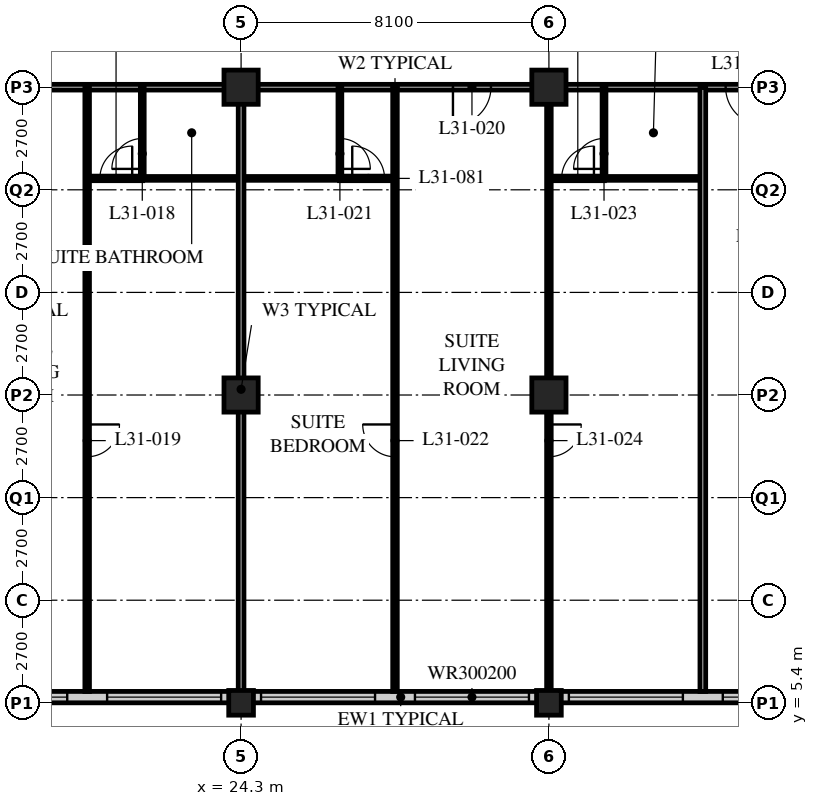
"""IFC4 building model, lengths in metres.
Left out: names, types, materials, properties, quantities, classifications, styles, units other than length and angle.
Written with IfcOpenShell. Run it as: python <this file> out.ifc"""

import sys

from ifc_helpers import new_model, si_unit, direction, frame, frame_2d, origin, origin_2d, place, context, subcontext, project, spatial, rectangle, hollow_rectangle, extrude, element, fill, save


model = new_model("IFC4")
c1 = context("Model", 3, precision=1e-05, world=origin(), true_north=direction((0.0, 1.0)))
c2 = subcontext(c1, "Body", "Model", "MODEL_VIEW")
j1 = project(units=[si_unit("LENGTHUNIT", "METRE"), si_unit("PLANEANGLEUNIT", "RADIAN")], contexts=[c1])
p1 = place(None, origin())
s1 = spatial("IfcSite", under=j1, at=p1, CompositionType="ELEMENT")
p2 = place(p1, origin())
s2 = spatial("IfcBuilding", under=s1, at=p2, CompositionType="ELEMENT")
p3 = place(p2, frame((0.0, 0.0, 123.8)))
s3 = spatial("IfcBuildingStorey", under=s2, at=p3, CompositionType="ELEMENT", Elevation=123.8)
p4 = place(p3, frame((24.3, 5.4, 0.0), z_axis=(0.0, 0.0, 1.0), x_axis=(1.0, 0.0, 0.0)))
e1 = element("IfcColumn", 1, at=p4, inside=s3, PredefinedType="COLUMN", context=c2, shape_type="SweptSolid", body=[
    extrude(hollow_rectangle(XDim=0.65, YDim=0.65, WallThickness=0.055, at=origin_2d()), origin(), (0.0, 0.0, 1.0), 3.4),
])
for number, where, z_axis, x_axis in (
    (2, (24.3, 13.5, 0.0), (0.0, 0.0, 1.0), (1.0, 0.0, 0.0)),
    (3, (24.3, 21.6, 0.0), (0.0, 0.0, 1.0), (1.0, 0.0, 0.0)),
):
    element("IfcColumn", number, at=place(p3, frame(where, z_axis=z_axis, x_axis=x_axis)), inside=s3, PredefinedType="COLUMN", context=c2, shape_type="SweptSolid", body=[
        extrude(hollow_rectangle(XDim=0.9, YDim=0.9, WallThickness=0.09, at=origin_2d()), origin(), (0.0, 0.0, 1.0), 3.4),
    ])
p5 = place(p3, frame((32.4, 5.4, 0.0), z_axis=(0.0, 0.0, 1.0), x_axis=(1.0, 0.0, 0.0)))
e4 = element("IfcColumn", 4, at=p5, inside=s3, PredefinedType="COLUMN", context=c2, shape_type="SweptSolid", body=[
    extrude(hollow_rectangle(XDim=0.65, YDim=0.65, WallThickness=0.055, at=origin_2d()), origin(), (0.0, 0.0, 1.0), 3.4),
])
for number, where, z_axis, x_axis in (
    (5, (32.4, 13.5, 0.0), (0.0, 0.0, 1.0), (1.0, 0.0, 0.0)),
    (6, (32.4, 21.6, 0.0), (0.0, 0.0, 1.0), (1.0, 0.0, 0.0)),
):
    element("IfcColumn", number, at=place(p3, frame(where, z_axis=z_axis, x_axis=x_axis)), inside=s3, PredefinedType="COLUMN", context=c2, shape_type="SweptSolid", body=[
        extrude(hollow_rectangle(XDim=0.9, YDim=0.9, WallThickness=0.09, at=origin_2d()), origin(), (0.0, 0.0, 1.0), 3.4),
    ])
p6 = place(p3, frame((8.4, 5.55, 0.0), z_axis=(0.0, 0.0, 1.0), x_axis=(1.0, 0.0, 0.0)))
e7 = element("IfcWall", 7, at=p6, inside=s3, PredefinedType="SOLIDWALL", context=c2, shape_type="SweptSolid", body=[
    extrude(rectangle(XDim=40.2, YDim=0.3, at=frame_2d((20.1, 0.0))), origin(), (0.0, 0.0, 1.0), 3.19),
])
p7 = place(p6, frame((0.225, 0.0, 0.9)))
e8 = element("IfcOpeningElement", 8, at=p7, cuts=e7, PredefinedType="OPENING", context=c2, shape_type="SweptSolid", body=[
    extrude(rectangle(XDim=3.0, YDim=2.0, at=frame_2d((1.5, 1.0))), frame((0.0, 0.16, 0.0), z_axis=(0.0, -1.0, 0.0), x_axis=(1.0, 0.0, 0.0)), (0.0, 0.0, 1.0), 0.32),
])
p8 = place(p6, frame((4.275, 0.0, 0.9)))
e9 = element("IfcOpeningElement", 9, at=p8, cuts=e7, PredefinedType="OPENING", context=c2, shape_type="SweptSolid", body=[
    extrude(rectangle(XDim=3.0, YDim=2.0, at=frame_2d((1.5, 1.0))), frame((0.0, 0.16, 0.0), z_axis=(0.0, -1.0, 0.0), x_axis=(1.0, 0.0, 0.0)), (0.0, 0.0, 1.0), 0.32),
])
p9 = place(p6, frame((8.325, 0.0, 0.9)))
e10 = element("IfcOpeningElement", 10, at=p9, cuts=e7, PredefinedType="OPENING", context=c2, shape_type="SweptSolid", body=[
    extrude(rectangle(XDim=3.0, YDim=2.0, at=frame_2d((1.5, 1.0))), frame((0.0, 0.16, 0.0), z_axis=(0.0, -1.0, 0.0), x_axis=(1.0, 0.0, 0.0)), (0.0, 0.0, 1.0), 0.32),
])
p10 = place(p6, frame((12.375, 0.0, 0.9)))
e11 = element("IfcOpeningElement", 11, at=p10, cuts=e7, PredefinedType="OPENING", context=c2, shape_type="SweptSolid", body=[
    extrude(rectangle(XDim=3.0, YDim=2.0, at=frame_2d((1.5, 1.0))), frame((0.0, 0.16, 0.0), z_axis=(0.0, -1.0, 0.0), x_axis=(1.0, 0.0, 0.0)), (0.0, 0.0, 1.0), 0.32),
])
p11 = place(p6, frame((16.425, 0.0, 0.9)))
e12 = element("IfcOpeningElement", 12, at=p11, cuts=e7, PredefinedType="OPENING", context=c2, shape_type="SweptSolid", body=[
    extrude(rectangle(XDim=3.0, YDim=2.0, at=frame_2d((1.5, 1.0))), frame((0.0, 0.16, 0.0), z_axis=(0.0, -1.0, 0.0), x_axis=(1.0, 0.0, 0.0)), (0.0, 0.0, 1.0), 0.32),
])
p12 = place(p6, frame((20.475, 0.0, 0.9)))
e13 = element("IfcOpeningElement", 13, at=p12, cuts=e7, PredefinedType="OPENING", context=c2, shape_type="SweptSolid", body=[
    extrude(rectangle(XDim=3.0, YDim=2.0, at=frame_2d((1.5, 1.0))), frame((0.0, 0.16, 0.0), z_axis=(0.0, -1.0, 0.0), x_axis=(1.0, 0.0, 0.0)), (0.0, 0.0, 1.0), 0.32),
])
p13 = place(p6, frame((24.525, 0.0, 0.9)))
e14 = element("IfcOpeningElement", 14, at=p13, cuts=e7, PredefinedType="OPENING", context=c2, shape_type="SweptSolid", body=[
    extrude(rectangle(XDim=3.0, YDim=2.0, at=frame_2d((1.5, 1.0))), frame((0.0, 0.16, 0.0), z_axis=(0.0, -1.0, 0.0), x_axis=(1.0, 0.0, 0.0)), (0.0, 0.0, 1.0), 0.32),
])
p14 = place(p6, frame((28.575, 0.0, 0.9)))
e15 = element("IfcOpeningElement", 15, at=p14, cuts=e7, PredefinedType="OPENING", context=c2, shape_type="SweptSolid", body=[
    extrude(rectangle(XDim=3.0, YDim=2.0, at=frame_2d((1.5, 1.0))), frame((0.0, 0.16, 0.0), z_axis=(0.0, -1.0, 0.0), x_axis=(1.0, 0.0, 0.0)), (0.0, 0.0, 1.0), 0.32),
])
p15 = place(p6, frame((32.625, 0.0, 0.9)))
e16 = element("IfcOpeningElement", 16, at=p15, cuts=e7, PredefinedType="OPENING", context=c2, shape_type="SweptSolid", body=[
    extrude(rectangle(XDim=3.0, YDim=2.0, at=frame_2d((1.5, 1.0))), frame((0.0, 0.16, 0.0), z_axis=(0.0, -1.0, 0.0), x_axis=(1.0, 0.0, 0.0)), (0.0, 0.0, 1.0), 0.32),
])
p16 = place(p6, frame((36.675, 0.0, 0.9)))
e17 = element("IfcOpeningElement", 17, at=p16, cuts=e7, PredefinedType="OPENING", context=c2, shape_type="SweptSolid", body=[
    extrude(rectangle(XDim=3.0, YDim=2.0, at=frame_2d((1.5, 1.0))), frame((0.0, 0.16, 0.0), z_axis=(0.0, -1.0, 0.0), x_axis=(1.0, 0.0, 0.0)), (0.0, 0.0, 1.0), 0.32),
])
p17 = place(p3, frame((8.1, 21.6, 0.0), z_axis=(0.0, 0.0, 1.0), x_axis=(1.0, 0.0, 0.0)))
e18 = element("IfcWall", 18, at=p17, inside=s3, PredefinedType="PARTITIONING", context=c2, shape_type="SweptSolid", body=[
    extrude(rectangle(XDim=40.5, YDim=0.15, at=frame_2d((20.25, 0.0))), origin(), (0.0, 0.0, 1.0), 2.578),
])
p18 = place(p17, frame((9.625, 0.0, 0.0)))
e19 = element("IfcOpeningElement", 19, at=p18, cuts=e18, PredefinedType="OPENING", context=c2, shape_type="SweptSolid", body=[
    extrude(rectangle(XDim=1.0, YDim=2.1, at=frame_2d((0.5, 1.05))), frame((0.0, 0.085, 0.0), z_axis=(0.0, -1.0, 0.0), x_axis=(1.0, 0.0, 0.0)), (0.0, 0.0, 1.0), 0.17),
])
p19 = place(p17, frame((21.775, 0.0, 0.0)))
e20 = element("IfcOpeningElement", 20, at=p19, cuts=e18, PredefinedType="OPENING", context=c2, shape_type="SweptSolid", body=[
    extrude(rectangle(XDim=1.0, YDim=2.1, at=frame_2d((0.5, 1.05))), frame((0.0, 0.085, 0.0), z_axis=(0.0, -1.0, 0.0), x_axis=(1.0, 0.0, 0.0)), (0.0, 0.0, 1.0), 0.17),
])
p20 = place(p17, frame((28.95, 0.0, 0.0)))
e21 = element("IfcOpeningElement", 21, at=p20, cuts=e18, PredefinedType="OPENING", context=c2, shape_type="SweptSolid", body=[
    extrude(rectangle(XDim=1.0, YDim=2.1, at=frame_2d((0.5, 1.05))), frame((0.0, 0.085, 0.0), z_axis=(0.0, -1.0, 0.0), x_axis=(1.0, 0.0, 0.0)), (0.0, 0.0, 1.0), 0.17),
])
p21 = place(p17, frame((34.85, 0.0, 0.0)))
e22 = element("IfcOpeningElement", 22, at=p21, cuts=e18, PredefinedType="OPENING", context=c2, shape_type="SweptSolid", body=[
    extrude(rectangle(XDim=1.0, YDim=2.1, at=frame_2d((0.5, 1.05))), frame((0.0, 0.085, 0.0), z_axis=(0.0, -1.0, 0.0), x_axis=(1.0, 0.0, 0.0)), (0.0, 0.0, 1.0), 0.17),
])
p22 = place(p17, frame((1.525, 0.0, 0.0)))
e23 = element("IfcOpeningElement", 23, at=p22, cuts=e18, PredefinedType="OPENING", context=c2, shape_type="SweptSolid", body=[
    extrude(rectangle(XDim=1.0, YDim=2.1, at=frame_2d((0.5, 1.05))), frame((0.0, 0.085, 0.0), z_axis=(0.0, -1.0, 0.0), x_axis=(1.0, 0.0, 0.0)), (0.0, 0.0, 1.0), 0.17),
])
p23 = place(p17, frame((37.975, 0.0, 0.0)))
e24 = element("IfcOpeningElement", 24, at=p23, cuts=e18, PredefinedType="OPENING", context=c2, shape_type="SweptSolid", body=[
    extrude(rectangle(XDim=1.0, YDim=2.1, at=frame_2d((0.5, 1.05))), frame((0.0, 0.085, 0.0), z_axis=(0.0, -1.0, 0.0), x_axis=(1.0, 0.0, 0.0)), (0.0, 0.0, 1.0), 0.17),
])
p24 = place(p3, frame((21.7, 19.2, 0.0), z_axis=(0.0, 0.0, 1.0), x_axis=(1.0, 0.0, 0.0)))
e25 = element("IfcWall", 25, at=p24, inside=s3, PredefinedType="PARTITIONING", context=c2, shape_type="SweptSolid", body=[
    extrude(rectangle(XDim=5.2, YDim=0.1, at=frame_2d((2.6, 0.0))), origin(), (0.0, 0.0, 1.0), 3.19),
])
p25 = place(p3, frame((21.7, 21.6, 0.0), z_axis=(0.0, 0.0, 1.0), x_axis=(0.0, -1.0, 0.0)))
e26 = element("IfcWall", 26, at=p25, inside=s3, PredefinedType="PARTITIONING", context=c2, shape_type="SweptSolid", body=[
    extrude(rectangle(XDim=2.4, YDim=0.1, at=frame_2d((1.2, 0.0))), origin(), (0.0, 0.0, 1.0), 3.19),
])
p26 = place(p25, frame((1.35, 0.0, 0.0)))
e27 = element("IfcOpeningElement", 27, at=p26, cuts=e26, PredefinedType="OPENING", context=c2, shape_type="SweptSolid", body=[
    extrude(rectangle(XDim=0.8, YDim=2.1, at=frame_2d((0.4, 1.05))), frame((0.0, 0.06, 0.0), z_axis=(0.0, -1.0, 0.0), x_axis=(1.0, 0.0, 0.0)), (0.0, 0.0, 1.0), 0.12),
])
p27 = place(p3, frame((20.25, 21.6, 0.0), z_axis=(0.0, 0.0, 1.0), x_axis=(0.0, -1.0, 0.0)))
e28 = element("IfcWall", 28, at=p27, inside=s3, PredefinedType="PARTITIONING", context=c2, shape_type="SweptSolid", body=[
    extrude(rectangle(XDim=15.9, YDim=0.12, at=frame_2d((7.95, 0.0))), origin(), (0.0, 0.0, 1.0), 3.19),
])
p28 = place(p27, frame((8.875, 0.0, 0.0)))
e29 = element("IfcOpeningElement", 29, at=p28, cuts=e28, PredefinedType="OPENING", context=c2, shape_type="SweptSolid", body=[
    extrude(rectangle(XDim=0.85, YDim=2.1, at=frame_2d((0.425, 1.05))), frame((0.0, 0.07, 0.0), z_axis=(0.0, -1.0, 0.0), x_axis=(1.0, 0.0, 0.0)), (0.0, 0.0, 1.0), 0.14),
])
p29 = place(p3, frame((24.3, 21.6, 0.0), z_axis=(0.0, 0.0, 1.0), x_axis=(0.0, -1.0, 0.0)))
e30 = element("IfcWall", 30, at=p29, inside=s3, PredefinedType="PARTITIONING", context=c2, shape_type="SweptSolid", body=[
    extrude(rectangle(XDim=15.9, YDim=0.15, at=frame_2d((7.95, 0.0))), origin(), (0.0, 0.0, 1.0), 2.578),
])
p30 = place(p3, frame((26.9, 21.6, 0.0), z_axis=(0.0, 0.0, 1.0), x_axis=(0.0, -1.0, 0.0)))
e31 = element("IfcWall", 31, at=p30, inside=s3, PredefinedType="PARTITIONING", context=c2, shape_type="SweptSolid", body=[
    extrude(rectangle(XDim=2.4, YDim=0.1, at=frame_2d((1.2, 0.0))), origin(), (0.0, 0.0, 1.0), 3.19),
])
p31 = place(p30, frame((1.35, 0.0, 0.0)))
e32 = element("IfcOpeningElement", 32, at=p31, cuts=e31, PredefinedType="OPENING", context=c2, shape_type="SweptSolid", body=[
    extrude(rectangle(XDim=0.8, YDim=2.1, at=frame_2d((0.4, 1.05))), frame((0.0, 0.06, 0.0), z_axis=(0.0, -1.0, 0.0), x_axis=(1.0, 0.0, 0.0)), (0.0, 0.0, 1.0), 0.12),
])
p32 = place(p3, frame((28.35, 21.6, 0.0), z_axis=(0.0, 0.0, 1.0), x_axis=(0.0, -1.0, 0.0)))
e33 = element("IfcWall", 33, at=p32, inside=s3, PredefinedType="PARTITIONING", context=c2, shape_type="SweptSolid", body=[
    extrude(rectangle(XDim=15.9, YDim=0.12, at=frame_2d((7.95, 0.0))), origin(), (0.0, 0.0, 1.0), 3.19),
])
p33 = place(p32, frame((8.875, 0.0, 0.0)))
e34 = element("IfcOpeningElement", 34, at=p33, cuts=e33, PredefinedType="OPENING", context=c2, shape_type="SweptSolid", body=[
    extrude(rectangle(XDim=0.85, YDim=2.1, at=frame_2d((0.425, 1.05))), frame((0.0, 0.07, 0.0), z_axis=(0.0, -1.0, 0.0), x_axis=(1.0, 0.0, 0.0)), (0.0, 0.0, 1.0), 0.14),
])
p34 = place(p3, frame((33.85, 19.2, 0.0), z_axis=(0.0, 0.0, 1.0), x_axis=(1.0, 0.0, 0.0)))
e35 = element("IfcWall", 35, at=p34, inside=s3, PredefinedType="PARTITIONING", context=c2, shape_type="SweptSolid", body=[
    extrude(rectangle(XDim=2.6, YDim=0.1, at=frame_2d((1.3, 0.0))), origin(), (0.0, 0.0, 1.0), 3.19),
])
p35 = place(p3, frame((33.85, 21.6, 0.0), z_axis=(0.0, 0.0, 1.0), x_axis=(0.0, -1.0, 0.0)))
e36 = element("IfcWall", 36, at=p35, inside=s3, PredefinedType="PARTITIONING", context=c2, shape_type="SweptSolid", body=[
    extrude(rectangle(XDim=2.4, YDim=0.1, at=frame_2d((1.2, 0.0))), origin(), (0.0, 0.0, 1.0), 3.19),
])
p36 = place(p35, frame((1.35, 0.0, 0.0)))
e37 = element("IfcOpeningElement", 37, at=p36, cuts=e36, PredefinedType="OPENING", context=c2, shape_type="SweptSolid", body=[
    extrude(rectangle(XDim=0.8, YDim=2.1, at=frame_2d((0.4, 1.05))), frame((0.0, 0.06, 0.0), z_axis=(0.0, -1.0, 0.0), x_axis=(1.0, 0.0, 0.0)), (0.0, 0.0, 1.0), 0.12),
])
p37 = place(p3, frame((32.4, 21.6, 0.0), z_axis=(0.0, 0.0, 1.0), x_axis=(0.0, -1.0, 0.0)))
e38 = element("IfcWall", 38, at=p37, inside=s3, PredefinedType="PARTITIONING", context=c2, shape_type="SweptSolid", body=[
    extrude(rectangle(XDim=15.9, YDim=0.12, at=frame_2d((7.95, 0.0))), origin(), (0.0, 0.0, 1.0), 2.578),
])
p38 = place(p37, frame((8.875, 0.0, 0.0)))
e39 = element("IfcOpeningElement", 39, at=p38, cuts=e38, PredefinedType="OPENING", context=c2, shape_type="SweptSolid", body=[
    extrude(rectangle(XDim=0.85, YDim=2.1, at=frame_2d((0.425, 1.05))), frame((0.0, 0.07, 0.0), z_axis=(0.0, -1.0, 0.0), x_axis=(1.0, 0.0, 0.0)), (0.0, 0.0, 1.0), 0.14),
])
p39 = place(p3, frame((36.45, 21.6, 0.0), z_axis=(0.0, 0.0, 1.0), x_axis=(0.0, -1.0, 0.0)))
e40 = element("IfcWall", 40, at=p39, inside=s3, PredefinedType="PARTITIONING", context=c2, shape_type="SweptSolid", body=[
    extrude(rectangle(XDim=15.9, YDim=0.15, at=frame_2d((7.95, 0.0))), origin(), (0.0, 0.0, 1.0), 3.19),
])
p40 = place(p3, frame((21.71, 19.2, 0.0), z_axis=(0.0, 0.0, 1.0), x_axis=(-1.0, 0.0, 0.0)))
e41 = element("IfcWall", 41, at=p40, inside=s3, PredefinedType="PARTITIONING", context=c2, shape_type="SweptSolid", body=[
    extrude(rectangle(XDim=1.46, YDim=0.12, at=frame_2d((0.73, 0.0))), origin(), (0.0, 0.0, 1.0), 3.19),
])
p41 = place(p40, frame((0.275, 0.0, 0.0)))
e42 = element("IfcOpeningElement", 42, at=p41, cuts=e41, PredefinedType="OPENING", context=c2, shape_type="SweptSolid", body=[
    extrude(rectangle(XDim=0.85, YDim=2.1, at=frame_2d((0.425, 1.05))), frame((0.0, 0.07, 0.0), z_axis=(0.0, -1.0, 0.0), x_axis=(1.0, 0.0, 0.0)), (0.0, 0.0, 1.0), 0.14),
])
p42 = place(p3, frame((28.35, 19.2, 0.0), z_axis=(0.0, 0.0, 1.0), x_axis=(-1.0, 0.0, 0.0)))
e43 = element("IfcWall", 43, at=p42, inside=s3, PredefinedType="PARTITIONING", context=c2, shape_type="SweptSolid", body=[
    extrude(rectangle(XDim=1.46, YDim=0.12, at=frame_2d((0.73, 0.0))), origin(), (0.0, 0.0, 1.0), 3.19),
])
p43 = place(p42, frame((0.275, 0.0, 0.0)))
e44 = element("IfcOpeningElement", 44, at=p43, cuts=e43, PredefinedType="OPENING", context=c2, shape_type="SweptSolid", body=[
    extrude(rectangle(XDim=0.85, YDim=2.1, at=frame_2d((0.425, 1.05))), frame((0.0, 0.07, 0.0), z_axis=(0.0, -1.0, 0.0), x_axis=(1.0, 0.0, 0.0)), (0.0, 0.0, 1.0), 0.14),
])
p44 = place(p3, frame((33.86, 19.2, 0.0), z_axis=(0.0, 0.0, 1.0), x_axis=(-1.0, 0.0, 0.0)))
e45 = element("IfcWall", 45, at=p44, inside=s3, PredefinedType="PARTITIONING", context=c2, shape_type="SweptSolid", body=[
    extrude(rectangle(XDim=1.46, YDim=0.12, at=frame_2d((0.73, 0.0))), origin(), (0.0, 0.0, 1.0), 3.19),
])
p45 = place(p44, frame((0.275, 0.0, 0.0)))
e46 = element("IfcOpeningElement", 46, at=p45, cuts=e45, PredefinedType="OPENING", context=c2, shape_type="SweptSolid", body=[
    extrude(rectangle(XDim=0.85, YDim=2.1, at=frame_2d((0.425, 1.05))), frame((0.0, 0.07, 0.0), z_axis=(0.0, -1.0, 0.0), x_axis=(1.0, 0.0, 0.0)), (0.0, 0.0, 1.0), 0.14),
])
p46 = place(p9, origin())
e47 = element("IfcWindow", 47, at=p46, inside=s3, PartitioningType="SINGLE_PANEL", PredefinedType="WINDOW", context=c2, shape_type="SweptSolid", body=[
    extrude(rectangle(XDim=3.0, YDim=2.0, at=frame_2d((1.5, 1.0))), frame((0.0, 0.03, 0.0), z_axis=(0.0, -1.0, 0.0), x_axis=(1.0, 0.0, 0.0)), (0.0, 0.0, 1.0), 0.06),
])
fill(e10, e47)
p47 = place(p10, origin())
e48 = element("IfcWindow", 48, at=p47, inside=s3, PartitioningType="SINGLE_PANEL", PredefinedType="WINDOW", context=c2, shape_type="SweptSolid", body=[
    extrude(rectangle(XDim=3.0, YDim=2.0, at=frame_2d((1.5, 1.0))), frame((0.0, 0.03, 0.0), z_axis=(0.0, -1.0, 0.0), x_axis=(1.0, 0.0, 0.0)), (0.0, 0.0, 1.0), 0.06),
])
fill(e11, e48)
p48 = place(p11, origin())
e49 = element("IfcWindow", 49, at=p48, inside=s3, PartitioningType="SINGLE_PANEL", PredefinedType="WINDOW", context=c2, shape_type="SweptSolid", body=[
    extrude(rectangle(XDim=3.0, YDim=2.0, at=frame_2d((1.5, 1.0))), frame((0.0, 0.03, 0.0), z_axis=(0.0, -1.0, 0.0), x_axis=(1.0, 0.0, 0.0)), (0.0, 0.0, 1.0), 0.06),
])
fill(e12, e49)
p49 = place(p12, origin())
e50 = element("IfcWindow", 50, at=p49, inside=s3, PartitioningType="SINGLE_PANEL", PredefinedType="WINDOW", context=c2, shape_type="SweptSolid", body=[
    extrude(rectangle(XDim=3.0, YDim=2.0, at=frame_2d((1.5, 1.0))), frame((0.0, 0.03, 0.0), z_axis=(0.0, -1.0, 0.0), x_axis=(1.0, 0.0, 0.0)), (0.0, 0.0, 1.0), 0.06),
])
fill(e13, e50)
p50 = place(p13, origin())
e51 = element("IfcWindow", 51, at=p50, inside=s3, PartitioningType="SINGLE_PANEL", PredefinedType="WINDOW", context=c2, shape_type="SweptSolid", body=[
    extrude(rectangle(XDim=3.0, YDim=2.0, at=frame_2d((1.5, 1.0))), frame((0.0, 0.03, 0.0), z_axis=(0.0, -1.0, 0.0), x_axis=(1.0, 0.0, 0.0)), (0.0, 0.0, 1.0), 0.06),
])
fill(e14, e51)
p51 = place(p14, origin())
e52 = element("IfcWindow", 52, at=p51, inside=s3, PartitioningType="SINGLE_PANEL", PredefinedType="WINDOW", context=c2, shape_type="SweptSolid", body=[
    extrude(rectangle(XDim=3.0, YDim=2.0, at=frame_2d((1.5, 1.0))), frame((0.0, 0.03, 0.0), z_axis=(0.0, -1.0, 0.0), x_axis=(1.0, 0.0, 0.0)), (0.0, 0.0, 1.0), 0.06),
])
fill(e15, e52)
p52 = place(p26, origin())
e53 = element("IfcDoor", 53, at=p52, inside=s3, OperationType="SINGLE_SWING_LEFT", PredefinedType="DOOR", context=c2, shape_type="SweptSolid", body=[
    extrude(rectangle(XDim=0.8, YDim=2.1, at=frame_2d((0.4, 1.05))), frame((0.0, 0.025, 0.0), z_axis=(0.0, -1.0, 0.0), x_axis=(1.0, 0.0, 0.0)), (0.0, 0.0, 1.0), 0.05),
])
fill(e27, e53)
p53 = place(p28, origin())
e54 = element("IfcDoor", 54, at=p53, inside=s3, OperationType="SINGLE_SWING_LEFT", PredefinedType="DOOR", context=c2, shape_type="SweptSolid", body=[
    extrude(rectangle(XDim=0.85, YDim=2.1, at=frame_2d((0.425, 1.05))), frame((0.0, 0.025, 0.0), z_axis=(0.0, -1.0, 0.0), x_axis=(1.0, 0.0, 0.0)), (0.0, 0.0, 1.0), 0.05),
])
fill(e29, e54)
p54 = place(p19, origin())
e55 = element("IfcDoor", 55, at=p54, inside=s3, OperationType="SINGLE_SWING_RIGHT", PredefinedType="DOOR", context=c2, shape_type="SweptSolid", body=[
    extrude(rectangle(XDim=1.0, YDim=2.1, at=frame_2d((0.5, 1.05))), frame((0.0, 0.025, 0.0), z_axis=(0.0, -1.0, 0.0), x_axis=(1.0, 0.0, 0.0)), (0.0, 0.0, 1.0), 0.05),
])
fill(e20, e55)
p55 = place(p31, origin())
e56 = element("IfcDoor", 56, at=p55, inside=s3, OperationType="SINGLE_SWING_RIGHT", PredefinedType="DOOR", context=c2, shape_type="SweptSolid", body=[
    extrude(rectangle(XDim=0.8, YDim=2.1, at=frame_2d((0.4, 1.05))), frame((0.0, 0.025, 0.0), z_axis=(0.0, -1.0, 0.0), x_axis=(1.0, 0.0, 0.0)), (0.0, 0.0, 1.0), 0.05),
])
fill(e32, e56)
p56 = place(p33, origin())
e57 = element("IfcDoor", 57, at=p56, inside=s3, OperationType="SINGLE_SWING_RIGHT", PredefinedType="DOOR", context=c2, shape_type="SweptSolid", body=[
    extrude(rectangle(XDim=0.85, YDim=2.1, at=frame_2d((0.425, 1.05))), frame((0.0, 0.025, 0.0), z_axis=(0.0, -1.0, 0.0), x_axis=(1.0, 0.0, 0.0)), (0.0, 0.0, 1.0), 0.05),
])
fill(e34, e57)
p57 = place(p36, origin())
e58 = element("IfcDoor", 58, at=p57, inside=s3, OperationType="SINGLE_SWING_LEFT", PredefinedType="DOOR", context=c2, shape_type="SweptSolid", body=[
    extrude(rectangle(XDim=0.8, YDim=2.1, at=frame_2d((0.4, 1.05))), frame((0.0, 0.025, 0.0), z_axis=(0.0, -1.0, 0.0), x_axis=(1.0, 0.0, 0.0)), (0.0, 0.0, 1.0), 0.05),
])
fill(e37, e58)
p58 = place(p38, origin())
e59 = element("IfcDoor", 59, at=p58, inside=s3, OperationType="SINGLE_SWING_LEFT", PredefinedType="DOOR", context=c2, shape_type="SweptSolid", body=[
    extrude(rectangle(XDim=0.85, YDim=2.1, at=frame_2d((0.425, 1.05))), frame((0.0, 0.025, 0.0), z_axis=(0.0, -1.0, 0.0), x_axis=(1.0, 0.0, 0.0)), (0.0, 0.0, 1.0), 0.05),
])
fill(e39, e59)
p59 = place(p20, origin())
e60 = element("IfcDoor", 60, at=p59, inside=s3, OperationType="SINGLE_SWING_LEFT", PredefinedType="DOOR", context=c2, shape_type="SweptSolid", body=[
    extrude(rectangle(XDim=1.0, YDim=2.1, at=frame_2d((0.5, 1.05))), frame((0.0, 0.025, 0.0), z_axis=(0.0, -1.0, 0.0), x_axis=(1.0, 0.0, 0.0)), (0.0, 0.0, 1.0), 0.05),
])
fill(e21, e60)
p60 = place(p41, origin())
e61 = element("IfcDoor", 61, at=p60, inside=s3, OperationType="SINGLE_SWING_RIGHT", PredefinedType="DOOR", context=c2, shape_type="SweptSolid", body=[
    extrude(rectangle(XDim=0.85, YDim=2.1, at=frame_2d((0.425, 1.05))), frame((0.0, 0.025, 0.0), z_axis=(0.0, -1.0, 0.0), x_axis=(1.0, 0.0, 0.0)), (0.0, 0.0, 1.0), 0.05),
])
fill(e42, e61)
p61 = place(p43, origin())
e62 = element("IfcDoor", 62, at=p61, inside=s3, OperationType="SINGLE_SWING_LEFT", PredefinedType="DOOR", context=c2, shape_type="SweptSolid", body=[
    extrude(rectangle(XDim=0.85, YDim=2.1, at=frame_2d((0.425, 1.05))), frame((0.0, 0.025, 0.0), z_axis=(0.0, -1.0, 0.0), x_axis=(1.0, 0.0, 0.0)), (0.0, 0.0, 1.0), 0.05),
])
fill(e44, e62)
p62 = place(p45, origin())
e63 = element("IfcDoor", 63, at=p62, inside=s3, OperationType="SINGLE_SWING_RIGHT", PredefinedType="DOOR", context=c2, shape_type="SweptSolid", body=[
    extrude(rectangle(XDim=0.85, YDim=2.1, at=frame_2d((0.425, 1.05))), frame((0.0, 0.025, 0.0), z_axis=(0.0, -1.0, 0.0), x_axis=(1.0, 0.0, 0.0)), (0.0, 0.0, 1.0), 0.05),
])
fill(e46, e63)
save(model, sys.argv[1])
